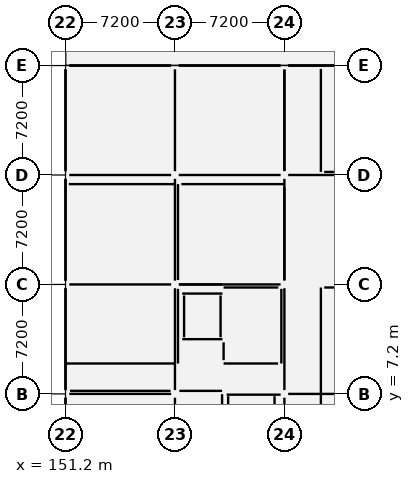
"""IFC4 building model, lengths in metres.
Left out: names, types, materials, properties, quantities, classifications, styles, units other than length and angle.
Written with IfcOpenShell. Run it as: python <this file> out.ifc"""

import sys

from ifc_helpers import new_model, si_unit, direction, frame, frame_2d, origin, origin_2d, place, context, subcontext, project, spatial, rectangle, extrude, element, fill, save


model = new_model("IFC4")
c1 = context("Model", 3, precision=1e-05, world=origin(), true_north=direction((0.0, 1.0)))
c2 = subcontext(c1, "Body", "Model", "MODEL_VIEW")
j1 = project(units=[si_unit("LENGTHUNIT", "METRE"), si_unit("PLANEANGLEUNIT", "RADIAN")], contexts=[c1])
p1 = place(None, origin())
s1 = spatial("IfcSite", under=j1, at=p1, CompositionType="ELEMENT")
p2 = place(p1, origin())
s2 = spatial("IfcBuilding", under=s1, at=p2, CompositionType="ELEMENT")
p3 = place(p2, frame((0.0, 0.0, 21.3)))
s3 = spatial("IfcBuildingStorey", under=s2, at=p3, CompositionType="ELEMENT", Elevation=21.3)
for number, where, z_axis, x_axis in (
    (1, (151.2, 7.2, 0.0), (0.0, 0.0, 1.0), (1.0, 0.0, 0.0)),
    (2, (151.2, 14.4, 0.0), (0.0, 0.0, 1.0), (1.0, 0.0, 0.0)),
    (3, (151.2, 21.6, 0.0), (0.0, 0.0, 1.0), (1.0, 0.0, 0.0)),
    (4, (151.2, 28.8, 0.0), (0.0, 0.0, 1.0), (1.0, 0.0, 0.0)),
    (5, (158.4, 7.2, 0.0), (0.0, 0.0, 1.0), (1.0, 0.0, 0.0)),
    (6, (158.4, 14.4, 0.0), (0.0, 0.0, 1.0), (1.0, 0.0, 0.0)),
    (7, (158.4, 21.6, 0.0), (0.0, 0.0, 1.0), (1.0, 0.0, 0.0)),
    (8, (158.4, 28.8, 0.0), (0.0, 0.0, 1.0), (1.0, 0.0, 0.0)),
    (9, (165.6, 7.2, 0.0), (0.0, 0.0, 1.0), (1.0, 0.0, 0.0)),
    (10, (165.6, 14.4, 0.0), (0.0, 0.0, 1.0), (1.0, 0.0, 0.0)),
    (11, (165.6, 21.6, 0.0), (0.0, 0.0, 1.0), (1.0, 0.0, 0.0)),
    (12, (165.6, 28.8, 0.0), (0.0, 0.0, 1.0), (1.0, 0.0, 0.0)),
):
    element("IfcColumn", number, at=place(p3, frame(where, z_axis=z_axis, x_axis=x_axis)), inside=s3, PredefinedType="COLUMN", context=c2, shape_type="SweptSolid", body=[
        extrude(rectangle(XDim=0.5, YDim=0.5, at=origin_2d()), origin(), (0.0, 0.0, 1.0), 3.9),
    ])
for number, where, z_axis, x_axis in (
    (13, (158.875, 10.8, 0.0), (0.0, 0.0, 1.0), (1.0, 0.0, 0.0)),
    (14, (158.875, 13.8, 0.0), (0.0, 0.0, 1.0), (1.0, 0.0, 0.0)),
):
    element("IfcWall", number, at=place(p3, frame(where, z_axis=z_axis, x_axis=x_axis)), inside=s3, PredefinedType="SHEAR", context=c2, shape_type="SweptSolid", body=[
        extrude(rectangle(XDim=2.65, YDim=0.25, at=frame_2d((1.325, 0.0))), origin(), (0.0, 0.0, 1.0), 3.65),
    ])
p4 = place(p3, frame((159.0, 10.925, 0.0), z_axis=(0.0, 0.0, 1.0), x_axis=(0.0, 1.0, 0.0)))
e15 = element("IfcWall", 15, at=p4, inside=s3, PredefinedType="SHEAR", context=c2, shape_type="SweptSolid", body=[
    extrude(rectangle(XDim=2.75, YDim=0.25, at=frame_2d((1.375, 0.0))), origin(), (0.0, 0.0, 1.0), 3.65),
])
p5 = place(p3, frame((161.4, 10.925, 0.0), z_axis=(0.0, 0.0, 1.0), x_axis=(0.0, 1.0, 0.0)))
e16 = element("IfcWall", 16, at=p5, inside=s3, PredefinedType="SHEAR", context=c2, shape_type="SweptSolid", body=[
    extrude(rectangle(XDim=2.75, YDim=0.25, at=frame_2d((1.375, 0.0))), origin(), (0.0, 0.0, 1.0), 3.65),
])
p6 = place(p5, frame((0.825, 0.0, 0.0)))
e17 = element("IfcOpeningElement", 17, at=p6, cuts=e16, PredefinedType="OPENING", context=c2, shape_type="SweptSolid", body=[
    extrude(rectangle(XDim=1.1, YDim=2.15, at=frame_2d((0.55, 1.075))), frame((0.0, 0.137, 0.0), z_axis=(0.0, -1.0, 0.0), x_axis=(1.0, 0.0, 0.0)), (0.0, 0.0, 1.0), 0.274),
])
p7 = place(p3, frame((161.8, 7.15, 0.0), z_axis=(0.0, 0.0, 1.0), x_axis=(1.0, 0.0, 0.0)))
e18 = element("IfcWall", 18, at=p7, inside=s3, PredefinedType="SHEAR", context=c2, shape_type="SweptSolid", body=[
    extrude(rectangle(XDim=3.55, YDim=0.2, at=frame_2d((1.775, 0.0))), origin(), (0.0, 0.0, 1.0), 3.65),
])
p8 = place(p7, frame((1.225, 0.0, 0.0)))
e19 = element("IfcOpeningElement", 19, at=p8, cuts=e18, PredefinedType="OPENING", context=c2, shape_type="SweptSolid", body=[
    extrude(rectangle(XDim=1.1, YDim=2.15, at=frame_2d((0.55, 1.075))), frame((0.0, 0.112, 0.0), z_axis=(0.0, -1.0, 0.0), x_axis=(1.0, 0.0, 0.0)), (0.0, 0.0, 1.0), 0.224),
])
for number, where, z_axis, x_axis in (
    (20, (161.9, 0.43, 0.0), (0.0, 0.0, 1.0), (0.0, 1.0, 0.0)),
    (21, (164.95, 0.43, 0.0), (0.0, 0.0, 1.0), (0.0, 1.0, 0.0)),
):
    element("IfcWall", number, at=place(p3, frame(where, z_axis=z_axis, x_axis=x_axis)), inside=s3, PredefinedType="SHEAR", context=c2, shape_type="SweptSolid", body=[
        extrude(rectangle(XDim=6.62, YDim=0.2, at=frame_2d((3.31, 0.0))), origin(), (0.0, 0.0, 1.0), 3.65),
    ])
p9 = place(p3, frame((172.55, 28.8, 0.0), z_axis=(0.0, 0.0, 1.0), x_axis=(-1.0, 0.0, 0.0)))
e22 = element("IfcWall", 22, at=p9, inside=s3, PredefinedType="ELEMENTEDWALL", context=c2, shape_type="SweptSolid", body=[
    extrude(rectangle(XDim=6.7, YDim=0.28, at=frame_2d((3.35, 0.0))), origin(), (0.0, 0.0, 1.0), 2.94),
])
p10 = place(p9, frame((4.944, 0.0, 0.0)))
e23 = element("IfcOpeningElement", 23, at=p10, cuts=e22, PredefinedType="OPENING", context=c2, shape_type="SweptSolid", body=[
    extrude(rectangle(XDim=1.1, YDim=2.15, at=frame_2d((0.55, 1.075))), frame((0.0, 0.152, 0.0), z_axis=(0.0, -1.0, 0.0), x_axis=(1.0, 0.0, 0.0)), (0.0, 0.0, 1.0), 0.304),
])
p11 = place(p3, frame((165.35, 28.8, 0.0), z_axis=(0.0, 0.0, 1.0), x_axis=(-1.0, 0.0, 0.0)))
e24 = element("IfcWall", 24, at=p11, inside=s3, PredefinedType="ELEMENTEDWALL", context=c2, shape_type="SweptSolid", body=[
    extrude(rectangle(XDim=6.7, YDim=0.28, at=frame_2d((3.35, 0.0))), origin(), (0.0, 0.0, 1.0), 2.89),
])
p12 = place(p3, frame((158.15, 28.8, 0.0), z_axis=(0.0, 0.0, 1.0), x_axis=(-1.0, 0.0, 0.0)))
e25 = element("IfcWall", 25, at=p12, inside=s3, PredefinedType="ELEMENTEDWALL", context=c2, shape_type="SweptSolid", body=[
    extrude(rectangle(XDim=6.7, YDim=0.28, at=frame_2d((3.35, 0.0))), origin(), (0.0, 0.0, 1.0), 2.94),
])
p13 = place(p3, frame((151.2, 25.4, 0.0), z_axis=(0.0, 0.0, 1.0), x_axis=(0.0, -1.0, 0.0)))
e26 = element("IfcWall", 26, at=p13, inside=s3, PredefinedType="SOLIDWALL", context=c2, shape_type="SweptSolid", body=[
    extrude(rectangle(XDim=0.4, YDim=0.36, at=frame_2d((0.2, 0.0))), origin(), (0.0, 0.0, 1.0), 3.04),
])
p14 = place(p3, frame((151.2, 21.35, 0.0), z_axis=(0.0, 0.0, 1.0), x_axis=(0.0, -1.0, 0.0)))
e27 = element("IfcWall", 27, at=p14, inside=s3, PredefinedType="ELEMENTEDWALL", context=c2, shape_type="SweptSolid", body=[
    extrude(rectangle(XDim=6.7, YDim=0.28, at=frame_2d((3.35, 0.0))), origin(), (0.0, 0.0, 1.0), 2.99),
])
p15 = place(p14, frame((2.7, 0.0, 0.85)))
e28 = element("IfcOpeningElement", 28, at=p15, cuts=e27, PredefinedType="OPENING", context=c2, shape_type="SweptSolid", body=[
    extrude(rectangle(XDim=1.3, YDim=1.85, at=frame_2d((0.65, 0.925))), frame((0.0, 0.152, 0.0), z_axis=(0.0, -1.0, 0.0), x_axis=(1.0, 0.0, 0.0)), (0.0, 0.0, 1.0), 0.304),
])
p16 = place(p3, frame((151.2, 11.0, 0.0), z_axis=(0.0, 0.0, 1.0), x_axis=(0.0, -1.0, 0.0)))
e29 = element("IfcWall", 29, at=p16, inside=s3, PredefinedType="SOLIDWALL", context=c2, shape_type="SweptSolid", body=[
    extrude(rectangle(XDim=0.4, YDim=0.36, at=frame_2d((0.2, 0.0))), origin(), (0.0, 0.0, 1.0), 3.04),
])
p17 = place(p3, frame((151.2, 6.95, 0.0), z_axis=(0.0, 0.0, 1.0), x_axis=(0.0, -1.0, 0.0)))
e30 = element("IfcWall", 30, at=p17, inside=s3, PredefinedType="ELEMENTEDWALL", context=c2, shape_type="SweptSolid", body=[
    extrude(rectangle(XDim=6.7, YDim=0.28, at=frame_2d((3.35, 0.0))), origin(), (0.0, 0.0, 1.0), 2.99),
])
p18 = place(p17, frame((2.9, 0.0, 0.8)))
e31 = element("IfcOpeningElement", 31, at=p18, cuts=e30, PredefinedType="OPENING", context=c2, shape_type="SweptSolid", body=[
    extrude(rectangle(XDim=0.9, YDim=2.0, at=frame_2d((0.45, 1.0))), frame((0.0, 0.152, 0.0), z_axis=(0.0, -1.0, 0.0), x_axis=(1.0, 0.0, 0.0)), (0.0, 0.0, 1.0), 0.304),
])
p19 = place(p3, frame((165.4, 9.2, 0.0), z_axis=(0.0, 0.0, 1.0), x_axis=(0.0, 1.0, 0.0)))
e32 = element("IfcWall", 32, at=p19, inside=s3, PredefinedType="STANDARD", context=c2, shape_type="SweptSolid", body=[
    extrude(rectangle(XDim=4.91, YDim=0.22, at=frame_2d((2.455, 0.0))), origin(), (0.0, 0.0, 1.0), 3.038),
])
p20 = place(p19, frame((1.855, 0.0, 0.0)))
e33 = element("IfcOpeningElement", 33, at=p20, cuts=e32, PredefinedType="OPENING", context=c2, shape_type="SweptSolid", body=[
    extrude(rectangle(XDim=1.2, YDim=2.2, at=frame_2d((0.6, 1.1))), frame((0.0, 0.122, 0.0), z_axis=(0.0, -1.0, 0.0), x_axis=(1.0, 0.0, 0.0)), (0.0, 0.0, 1.0), 0.244),
])
p21 = place(p3, frame((161.6, 9.2, 0.0), z_axis=(0.0, 0.0, 1.0), x_axis=(1.0, 0.0, 0.0)))
e34 = element("IfcWall", 34, at=p21, inside=s3, PredefinedType="STANDARD", context=c2, shape_type="SweptSolid", body=[
    extrude(rectangle(XDim=3.58, YDim=0.22, at=frame_2d((1.79, 0.0))), origin(), (0.0, 0.0, 1.0), 3.62),
])
p22 = place(p3, frame((161.6, 14.2, 0.0), z_axis=(0.0, 0.0, 1.0), x_axis=(1.0, 0.0, 0.0)))
e35 = element("IfcWall", 35, at=p22, inside=s3, PredefinedType="STANDARD", context=c2, shape_type="SweptSolid", body=[
    extrude(rectangle(XDim=3.599, YDim=0.22, at=frame_2d((1.8, 0.0))), origin(), (0.0, 0.0, 1.0), 2.938),
])
p23 = place(p3, frame((161.6, 9.42, 0.0), z_axis=(0.0, 0.0, 1.0), x_axis=(0.0, 1.0, 0.0)))
e36 = element("IfcWall", 36, at=p23, inside=s3, PredefinedType="STANDARD", context=c2, shape_type="SweptSolid", body=[
    extrude(rectangle(XDim=1.174, YDim=0.22, at=frame_2d((0.587, 0.0))), origin(), (0.0, 0.0, 1.0), 3.62),
])
p24 = place(p3, frame((151.49, 7.4, 0.0), z_axis=(0.0, 0.0, 1.0), x_axis=(1.0, 0.0, 0.0)))
e37 = element("IfcWall", 37, at=p24, inside=s3, PredefinedType="STANDARD", context=c2, shape_type="SweptSolid", body=[
    extrude(rectangle(XDim=6.62, YDim=0.15, at=frame_2d((3.31, 0.0))), origin(), (0.0, 0.0, 1.0), 2.888),
])
p25 = place(p24, frame((2.785, 0.0, 0.0)))
e38 = element("IfcOpeningElement", 38, at=p25, cuts=e37, PredefinedType="OPENING", context=c2, shape_type="SweptSolid", body=[
    extrude(rectangle(XDim=1.05, YDim=2.15, at=frame_2d((0.525, 1.075))), frame((0.0, 0.087, 0.0), z_axis=(0.0, -1.0, 0.0), x_axis=(1.0, 0.0, 0.0)), (0.0, 0.0, 1.0), 0.174),
])
p26 = place(p3, frame((158.69, 7.4, 0.0), z_axis=(0.0, 0.0, 1.0), x_axis=(1.0, 0.0, 0.0)))
e39 = element("IfcWall", 39, at=p26, inside=s3, PredefinedType="STANDARD", context=c2, shape_type="SweptSolid", body=[
    extrude(rectangle(XDim=2.81, YDim=0.15, at=frame_2d((1.405, 0.0))), origin(), (0.0, 0.0, 1.0), 3.62),
])
p27 = place(p3, frame((161.5, 0.22, 0.0), z_axis=(0.0, 0.0, 1.0), x_axis=(0.0, 1.0, 0.0)))
e40 = element("IfcWall", 40, at=p27, inside=s3, PredefinedType="STANDARD", context=c2, shape_type="SweptSolid", body=[
    extrude(rectangle(XDim=6.96, YDim=0.15, at=frame_2d((3.48, 0.0))), origin(), (0.0, 0.0, 1.0), 3.62),
])
p28 = place(p3, frame((168.0, 0.0, 0.0), z_axis=(0.0, 0.0, 1.0), x_axis=(0.0, 1.0, 0.0)))
e41 = element("IfcWall", 41, at=p28, inside=s3, PredefinedType="PARTITIONING", context=c2, shape_type="SweptSolid", body=[
    extrude(rectangle(XDim=14.2, YDim=0.1, at=frame_2d((7.1, 0.0))), origin(), (0.0, 0.0, 1.0), 2.938),
])
p29 = place(p28, frame((6.6, 0.0, 0.0)))
e42 = element("IfcOpeningElement", 42, at=p29, cuts=e41, PredefinedType="OPENING", context=c2, shape_type="SweptSolid", body=[
    extrude(rectangle(XDim=1.0, YDim=2.15, at=frame_2d((0.5, 1.075))), frame((0.0, 0.062, 0.0), z_axis=(0.0, -1.0, 0.0), x_axis=(1.0, 0.0, 0.0)), (0.0, 0.0, 1.0), 0.124),
])
p30 = place(p3, frame((168.22, 14.2, 0.0), z_axis=(0.0, 0.0, 1.0), x_axis=(1.0, 0.0, 0.0)))
e43 = element("IfcWall", 43, at=p30, inside=s3, PredefinedType="PARTITIONING", context=c2, shape_type="SweptSolid", body=[
    extrude(rectangle(XDim=4.29, YDim=0.1, at=frame_2d((2.145, 0.0))), origin(), (0.0, 0.0, 1.0), 3.62),
])
p31 = place(p3, frame((158.6, 9.2, 0.0), z_axis=(0.0, 0.0, 1.0), x_axis=(0.0, 1.0, 0.0)))
e44 = element("IfcWall", 44, at=p31, inside=s3, PredefinedType="PARTITIONING", context=c2, shape_type="SweptSolid", body=[
    extrude(rectangle(XDim=4.91, YDim=0.1, at=frame_2d((2.455, 0.0))), origin(), (0.0, 0.0, 1.0), 3.038),
])
p32 = place(p3, frame((158.6, 14.69, 0.0), z_axis=(0.0, 0.0, 1.0), x_axis=(0.0, 1.0, 0.0)))
e45 = element("IfcWall", 45, at=p32, inside=s3, PredefinedType="PARTITIONING", context=c2, shape_type="SweptSolid", body=[
    extrude(rectangle(XDim=6.31, YDim=0.1, at=frame_2d((3.155, 0.0))), origin(), (0.0, 0.0, 1.0), 2.988),
])
p33 = place(p3, frame((151.2, 9.2, 0.0), z_axis=(0.0, 0.0, 1.0), x_axis=(1.0, 0.0, 0.0)))
e46 = element("IfcWall", 46, at=p33, inside=s3, PredefinedType="PARTITIONING", context=c2, shape_type="SweptSolid", body=[
    extrude(rectangle(XDim=7.18, YDim=0.1, at=frame_2d((3.59, 0.0))), origin(), (0.0, 0.0, 1.0), 3.038),
])
p34 = place(p33, frame((3.09, 0.0, 0.0)))
e47 = element("IfcOpeningElement", 47, at=p34, cuts=e46, PredefinedType="OPENING", context=c2, shape_type="SweptSolid", body=[
    extrude(rectangle(XDim=1.0, YDim=2.15, at=frame_2d((0.5, 1.075))), frame((0.0, 0.062, 0.0), z_axis=(0.0, -1.0, 0.0), x_axis=(1.0, 0.0, 0.0)), (0.0, 0.0, 1.0), 0.124),
])
p35 = place(p3, frame((151.42, 21.0, 0.0), z_axis=(0.0, 0.0, 1.0), x_axis=(1.0, 0.0, 0.0)))
e48 = element("IfcWall", 48, at=p35, inside=s3, PredefinedType="PARTITIONING", context=c2, shape_type="SweptSolid", body=[
    extrude(rectangle(XDim=6.96, YDim=0.1, at=frame_2d((3.48, 0.0))), origin(), (0.0, 0.0, 1.0), 2.988),
])
p36 = place(p3, frame((165.6, 21.89, 0.0), z_axis=(0.0, 0.0, 1.0), x_axis=(0.0, 1.0, 0.0)))
e49 = element("IfcWall", 49, at=p36, inside=s3, PredefinedType="PARTITIONING", context=c2, shape_type="SweptSolid", body=[
    extrude(rectangle(XDim=6.62, YDim=0.1, at=frame_2d((3.31, 0.0))), origin(), (0.0, 0.0, 1.0), 3.038),
])
p37 = place(p36, frame((2.785, 0.0, 0.0)))
e50 = element("IfcOpeningElement", 50, at=p37, cuts=e49, PredefinedType="OPENING", context=c2, shape_type="SweptSolid", body=[
    extrude(rectangle(XDim=1.05, YDim=2.15, at=frame_2d((0.525, 1.075))), frame((0.0, 0.062, 0.0), z_axis=(0.0, -1.0, 0.0), x_axis=(1.0, 0.0, 0.0)), (0.0, 0.0, 1.0), 0.124),
])
p38 = place(p3, frame((158.82, 21.0, 0.0), z_axis=(0.0, 0.0, 1.0), x_axis=(1.0, 0.0, 0.0)))
e51 = element("IfcWall", 51, at=p38, inside=s3, PredefinedType="PARTITIONING", context=c2, shape_type="SweptSolid", body=[
    extrude(rectangle(XDim=6.78, YDim=0.1, at=frame_2d((3.39, 0.0))), origin(), (0.0, 0.0, 1.0), 2.988),
])
p39 = place(p3, frame((165.6, 14.69, 0.0), z_axis=(0.0, 0.0, 1.0), x_axis=(0.0, 1.0, 0.0)))
e52 = element("IfcWall", 52, at=p39, inside=s3, PredefinedType="STANDARD", context=c2, shape_type="SweptSolid", body=[
    extrude(rectangle(XDim=6.09, YDim=0.22, at=frame_2d((3.045, 0.0))), origin(), (0.0, 0.0, 1.0), 2.988),
])
p40 = place(p39, frame((2.37, 0.0, 0.0)))
e53 = element("IfcOpeningElement", 53, at=p40, cuts=e52, PredefinedType="OPENING", context=c2, shape_type="SweptSolid", body=[
    extrude(rectangle(XDim=1.35, YDim=2.2, at=frame_2d((0.675, 1.1))), frame((0.0, 0.122, 0.0), z_axis=(0.0, -1.0, 0.0), x_axis=(1.0, 0.0, 0.0)), (0.0, 0.0, 1.0), 0.244),
])
p41 = place(p3, frame((158.69, 14.4, 0.0), z_axis=(0.0, 0.0, 1.0), x_axis=(1.0, 0.0, 0.0)))
e54 = element("IfcWall", 54, at=p41, inside=s3, PredefinedType="STANDARD", context=c2, shape_type="SweptSolid", body=[
    extrude(rectangle(XDim=2.819, YDim=0.22, at=frame_2d((1.409, 0.0))), origin(), (0.0, 0.0, 1.0), 2.938),
])
p42 = place(p3, frame((168.0, 21.8, 0.0), z_axis=(0.0, 0.0, 1.0), x_axis=(0.0, 1.0, 0.0)))
e55 = element("IfcWall", 55, at=p42, inside=s3, PredefinedType="PLUMBINGWALL", context=c2, shape_type="SweptSolid", body=[
    extrude(rectangle(XDim=6.78, YDim=0.18, at=frame_2d((3.39, 0.0))), origin(), (0.0, 0.0, 1.0), 2.888),
])
p43 = place(p42, frame((2.94, 0.0, 0.0)))
e56 = element("IfcOpeningElement", 56, at=p43, cuts=e55, PredefinedType="OPENING", context=c2, shape_type="SweptSolid", body=[
    extrude(rectangle(XDim=0.9, YDim=2.1, at=frame_2d((0.45, 1.05))), frame((0.0, 0.102, 0.0), z_axis=(0.0, -1.0, 0.0), x_axis=(1.0, 0.0, 0.0)), (0.0, 0.0, 1.0), 0.204),
])
p44 = place(p3, frame((168.22, 21.8, 0.0), z_axis=(0.0, 0.0, 1.0), x_axis=(1.0, 0.0, 0.0)))
e57 = element("IfcWall", 57, at=p44, inside=s3, PredefinedType="PLUMBINGWALL", context=c2, shape_type="SweptSolid", body=[
    extrude(rectangle(XDim=4.29, YDim=0.18, at=frame_2d((2.145, 0.0))), origin(), (0.0, 0.0, 1.0), 2.888),
])
p45 = place(p10, frame((1.1, 0.0, 0.0), z_axis=(0.0, 0.0, 1.0), x_axis=(-1.0, 0.0, 0.0)))
e58 = element("IfcDoor", 58, at=p45, inside=s3, OperationType="SINGLE_SWING_RIGHT", PredefinedType="DOOR", context=c2, shape_type="SweptSolid", body=[
    extrude(rectangle(XDim=1.1, YDim=2.15, at=frame_2d((0.55, 1.075))), frame((0.0, 0.025, 0.0), z_axis=(0.0, -1.0, 0.0), x_axis=(1.0, 0.0, 0.0)), (0.0, 0.0, 1.0), 0.05),
])
fill(e23, e58)
p46 = place(p15, origin())
e59 = element("IfcWindow", 59, at=p46, inside=s3, PartitioningType="SINGLE_PANEL", PredefinedType="WINDOW", context=c2, shape_type="SweptSolid", body=[
    extrude(rectangle(XDim=1.3, YDim=1.85, at=frame_2d((0.65, 0.925))), frame((0.0, 0.03, 0.0), z_axis=(0.0, -1.0, 0.0), x_axis=(1.0, 0.0, 0.0)), (0.0, 0.0, 1.0), 0.06),
])
fill(e28, e59)
p47 = place(p8, frame((1.1, 0.0, 0.0), z_axis=(0.0, 0.0, 1.0), x_axis=(-1.0, 0.0, 0.0)))
e60 = element("IfcDoor", 60, at=p47, inside=s3, OperationType="SINGLE_SWING_RIGHT", PredefinedType="DOOR", context=c2, shape_type="SweptSolid", body=[
    extrude(rectangle(XDim=1.1, YDim=2.15, at=frame_2d((0.55, 1.075))), frame((0.0, 0.025, 0.0), z_axis=(0.0, -1.0, 0.0), x_axis=(1.0, 0.0, 0.0)), (0.0, 0.0, 1.0), 0.05),
])
fill(e19, e60)
p48 = place(p6, origin())
e61 = element("IfcDoor", 61, at=p48, inside=s3, OperationType="SLIDING_TO_LEFT", PredefinedType="DOOR", context=c2, shape_type="SweptSolid", body=[
    extrude(rectangle(XDim=1.1, YDim=2.15, at=frame_2d((0.55, 1.075))), frame((0.0, 0.025, 0.0), z_axis=(0.0, -1.0, 0.0), x_axis=(1.0, 0.0, 0.0)), (0.0, 0.0, 1.0), 0.05),
])
fill(e17, e61)
p49 = place(p20, origin())
e62 = element("IfcDoor", 62, at=p49, inside=s3, OperationType="SINGLE_SWING_LEFT", PredefinedType="DOOR", context=c2, shape_type="SweptSolid", body=[
    extrude(rectangle(XDim=1.2, YDim=2.2, at=frame_2d((0.6, 1.1))), frame((0.0, 0.025, 0.0), z_axis=(0.0, -1.0, 0.0), x_axis=(1.0, 0.0, 0.0)), (0.0, 0.0, 1.0), 0.05),
])
fill(e33, e62)
p50 = place(p25, origin())
e63 = element("IfcDoor", 63, at=p50, inside=s3, OperationType="SINGLE_SWING_RIGHT", PredefinedType="DOOR", context=c2, shape_type="SweptSolid", body=[
    extrude(rectangle(XDim=1.05, YDim=2.15, at=frame_2d((0.525, 1.075))), frame((0.0, 0.025, 0.0), z_axis=(0.0, -1.0, 0.0), x_axis=(1.0, 0.0, 0.0)), (0.0, 0.0, 1.0), 0.05),
])
fill(e38, e63)
p51 = place(p29, origin())
e64 = element("IfcDoor", 64, at=p51, inside=s3, OperationType="SINGLE_SWING_LEFT", PredefinedType="DOOR", context=c2, shape_type="SweptSolid", body=[
    extrude(rectangle(XDim=1.0, YDim=2.15, at=frame_2d((0.5, 1.075))), frame((0.0, 0.025, 0.0), z_axis=(0.0, -1.0, 0.0), x_axis=(1.0, 0.0, 0.0)), (0.0, 0.0, 1.0), 0.05),
])
fill(e42, e64)
p52 = place(p34, origin())
e65 = element("IfcDoor", 65, at=p52, inside=s3, OperationType="SINGLE_SWING_RIGHT", PredefinedType="DOOR", context=c2, shape_type="SweptSolid", body=[
    extrude(rectangle(XDim=1.0, YDim=2.15, at=frame_2d((0.5, 1.075))), frame((0.0, 0.025, 0.0), z_axis=(0.0, -1.0, 0.0), x_axis=(1.0, 0.0, 0.0)), (0.0, 0.0, 1.0), 0.05),
])
fill(e47, e65)
p53 = place(p37, origin())
e66 = element("IfcDoor", 66, at=p53, inside=s3, OperationType="SINGLE_SWING_LEFT", PredefinedType="DOOR", context=c2, shape_type="SweptSolid", body=[
    extrude(rectangle(XDim=1.05, YDim=2.15, at=frame_2d((0.525, 1.075))), frame((0.0, 0.025, 0.0), z_axis=(0.0, -1.0, 0.0), x_axis=(1.0, 0.0, 0.0)), (0.0, 0.0, 1.0), 0.05),
])
fill(e50, e66)
p54 = place(p40, origin())
e67 = element("IfcDoor", 67, at=p54, inside=s3, OperationType="SINGLE_SWING_RIGHT", PredefinedType="DOOR", context=c2, shape_type="SweptSolid", body=[
    extrude(rectangle(XDim=1.35, YDim=2.2, at=frame_2d((0.675, 1.1))), frame((0.0, 0.025, 0.0), z_axis=(0.0, -1.0, 0.0), x_axis=(1.0, 0.0, 0.0)), (0.0, 0.0, 1.0), 0.05),
])
fill(e53, e67)
p55 = place(p43, origin())
e68 = element("IfcDoor", 68, at=p55, inside=s3, OperationType="SINGLE_SWING_LEFT", PredefinedType="DOOR", context=c2, shape_type="SweptSolid", body=[
    extrude(rectangle(XDim=0.9, YDim=2.1, at=frame_2d((0.45, 1.05))), frame((0.0, 0.025, 0.0), z_axis=(0.0, -1.0, 0.0), x_axis=(1.0, 0.0, 0.0)), (0.0, 0.0, 1.0), 0.05),
])
fill(e56, e68)
save(model, sys.argv[1])
